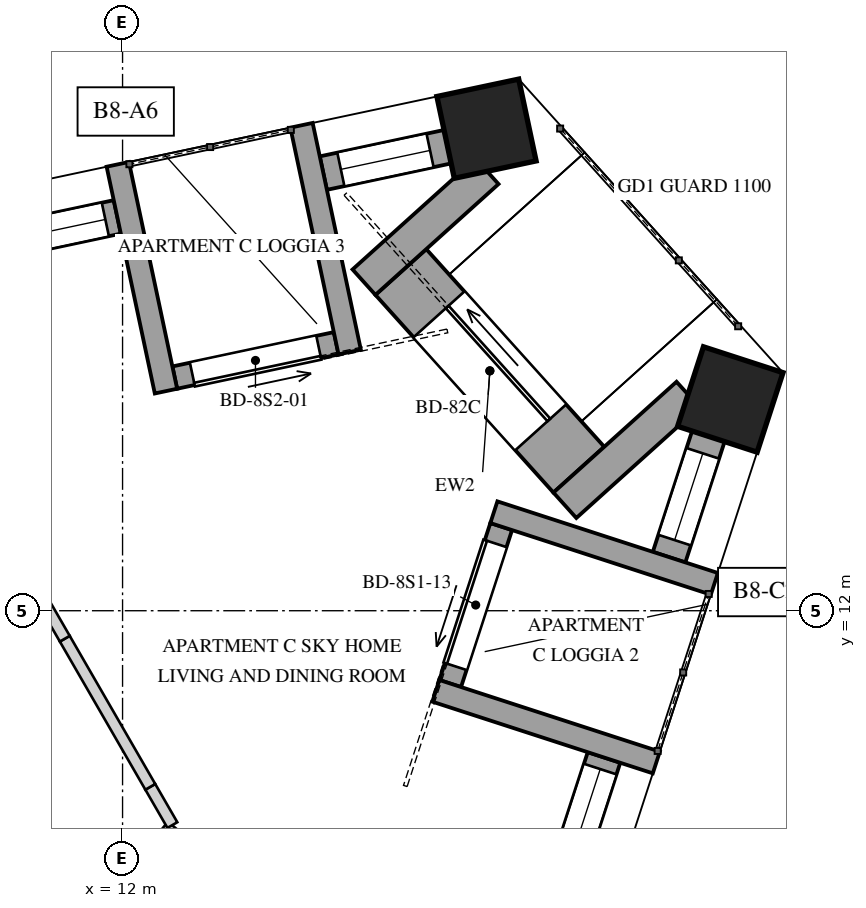
"""IFC4 building model, lengths in metres.
Left out: names, types, materials, properties, quantities, classifications, styles, units other than length and angle.
Written with IfcOpenShell. Run it as: python <this file> out.ifc"""

import sys

from ifc_helpers import new_model, si_unit, direction, frame, frame_2d, origin, origin_2d, place, context, subcontext, project, spatial, rectangle, extrude, element, fill, save


model = new_model("IFC4")
c1 = context("Model", 3, precision=1e-05, world=origin(), true_north=direction((0.0, 1.0)))
c2 = subcontext(c1, "Body", "Model", "MODEL_VIEW")
j1 = project(units=[si_unit("LENGTHUNIT", "METRE"), si_unit("PLANEANGLEUNIT", "RADIAN")], contexts=[c1])
p1 = place(None, origin())
s1 = spatial("IfcSite", under=j1, at=p1, CompositionType="ELEMENT")
p2 = place(p1, origin())
s2 = spatial("IfcBuilding", under=s1, at=p2, CompositionType="ELEMENT")
p3 = place(p2, frame((0.0, 0.0, 344.4)))
s3 = spatial("IfcBuildingStorey", under=s2, at=p3, CompositionType="ELEMENT", Elevation=344.4)
for number, where, z_axis, x_axis in (
    (1, (19.996, 14.779, 0.0), (0.0, 0.0, 1.0), (0.309, 0.951, 0.0)),
    (2, (16.788, 18.341, 0.0), (0.0, 0.0, 1.0), (-0.978, -0.208, 0.0)),
):
    element("IfcColumn", number, at=place(p3, frame(where, z_axis=z_axis, x_axis=x_axis)), inside=s3, PredefinedType="COLUMN", context=c2, shape_type="SweptSolid", body=[
        extrude(rectangle(XDim=1.1, YDim=1.1, at=origin_2d()), origin(), (0.0, 0.0, 1.0), 4.0),
    ])
p4 = place(p3, frame((17.632, 7.909, 0.0), z_axis=(0.0, 0.0, 1.0), x_axis=(0.309027740273, 0.951053024674, 0.0)))
e3 = element("IfcWall", 3, at=p4, inside=s3, PredefinedType="SOLIDWALL", context=c2, shape_type="SweptSolid", body=[
    extrude(rectangle(XDim=2.271, YDim=0.45, at=frame_2d((1.136, 0.0))), origin(), (0.0, 0.0, 1.0), 3.3),
])
p5 = place(p4, frame((0.161, 0.0, 0.4)))
e4 = element("IfcOpeningElement", 4, at=p5, cuts=e3, PredefinedType="OPENING", context=c2, shape_type="SweptSolid", body=[
    extrude(rectangle(XDim=1.95, YDim=2.75, at=frame_2d((0.975, 1.375))), frame((0.0, 0.235, 0.0), z_axis=(0.0, -1.0, 0.0), x_axis=(1.0, 0.0, 0.0)), (0.0, 0.0, 1.0), 0.47),
])
p6 = place(p3, frame((19.19, 12.705, 0.0), z_axis=(0.0, 0.0, 1.0), x_axis=(0.30898696848, 0.951066271776, 0.0)))
e5 = element("IfcWall", 5, at=p6, inside=s3, PredefinedType="SOLIDWALL", context=c2, shape_type="SweptSolid", body=[
    extrude(rectangle(XDim=1.671, YDim=0.45, at=frame_2d((0.835, 0.0))), origin(), (0.0, 0.0, 1.0), 3.3),
])
p7 = place(p6, frame((0.236, 0.0, 0.4)))
e6 = element("IfcOpeningElement", 6, at=p7, cuts=e5, PredefinedType="OPENING", context=c2, shape_type="SweptSolid", body=[
    extrude(rectangle(XDim=1.2, YDim=2.1, at=frame_2d((0.6, 1.05))), frame((0.0, 0.235, 0.0), z_axis=(0.0, -1.0, 0.0), x_axis=(1.0, 0.0, 0.0)), (0.0, 0.0, 1.0), 0.47),
])
p8 = place(p3, frame((16.276, 18.105, 0.0), z_axis=(0.0, 0.0, 1.0), x_axis=(-0.978126168783, -0.208012494676, 0.0)))
e7 = element("IfcWall", 7, at=p8, inside=s3, PredefinedType="SOLIDWALL", context=c2, shape_type="SweptSolid", body=[
    extrude(rectangle(XDim=1.671, YDim=0.45, at=frame_2d((0.836, 0.0))), origin(), (0.0, 0.0, 1.0), 3.3),
])
p9 = place(p8, frame((0.236, 0.0, 0.4)))
e8 = element("IfcOpeningElement", 8, at=p9, cuts=e7, PredefinedType="OPENING", context=c2, shape_type="SweptSolid", body=[
    extrude(rectangle(XDim=1.2, YDim=2.1, at=frame_2d((0.6, 1.05))), frame((0.0, 0.235, 0.0), z_axis=(0.0, -1.0, 0.0), x_axis=(1.0, 0.0, 0.0)), (0.0, 0.0, 1.0), 0.47),
])
p10 = place(p3, frame((11.931, 17.181, 0.0), z_axis=(0.0, 0.0, 1.0), x_axis=(-0.978153386925, -0.207884467067, 0.0)))
e9 = element("IfcWall", 9, at=p10, inside=s3, PredefinedType="SOLIDWALL", context=c2, shape_type="SweptSolid", body=[
    extrude(rectangle(XDim=2.271, YDim=0.45, at=frame_2d((1.136, 0.0))), origin(), (0.0, 0.0, 1.0), 3.3),
])
p11 = place(p10, frame((0.161, 0.0, 0.4)))
e10 = element("IfcOpeningElement", 10, at=p11, cuts=e9, PredefinedType="OPENING", context=c2, shape_type="SweptSolid", body=[
    extrude(rectangle(XDim=1.95, YDim=2.75, at=frame_2d((0.975, 1.375))), frame((0.0, 0.235, 0.0), z_axis=(0.0, -1.0, 0.0), x_axis=(1.0, 0.0, 0.0)), (0.0, 0.0, 1.0), 0.47),
])
p12 = place(p3, frame((16.311, 11.042, 0.0), z_axis=(0.0, 0.0, 1.0), x_axis=(0.308999623589, 0.95106216023, 0.0)))
e11 = element("IfcWall", 11, at=p12, inside=s3, PredefinedType="SOLIDWALL", context=c2, shape_type="SweptSolid", body=[
    extrude(rectangle(XDim=2.171, YDim=0.3, at=frame_2d((1.085, 0.0))), origin(), (0.0, 0.0, 1.0), 3.3),
])
p13 = place(p12, frame((0.236, 0.0, 0.0)))
e12 = element("IfcOpeningElement", 12, at=p13, cuts=e11, PredefinedType="OPENING", context=c2, shape_type="SweptSolid", body=[
    extrude(rectangle(XDim=1.7, YDim=2.5, at=frame_2d((0.85, 1.25))), frame((0.0, 0.16, 0.0), z_axis=(0.0, -1.0, 0.0), x_axis=(1.0, 0.0, 0.0)), (0.0, 0.0, 1.0), 0.32),
])
for number, where, z_axis, x_axis in (
    (13, (19.022, 10.003, 0.0), (0.0, 0.0, 1.0), (-0.951, 0.309, 0.0)),
    (14, (19.786, 12.354, 0.0), (0.0, 0.0, 1.0), (-0.951, 0.309, 0.0)),
):
    element("IfcWall", number, at=place(p3, frame(where, z_axis=z_axis, x_axis=x_axis)), inside=s3, PredefinedType="SOLIDWALL", context=c2, shape_type="SweptSolid", body=[
        extrude(rectangle(XDim=3.05, YDim=0.3, at=frame_2d((1.525, 0.0))), origin(), (0.0, 0.0, 1.0), 3.3),
    ])
p14 = place(p3, frame((14.811, 15.518, 0.0), z_axis=(0.0, 0.0, 1.0), x_axis=(-0.978148276005, -0.207908513891, 0.0)))
e15 = element("IfcWall", 15, at=p14, inside=s3, PredefinedType="SOLIDWALL", context=c2, shape_type="SweptSolid", body=[
    extrude(rectangle(XDim=2.171, YDim=0.3, at=frame_2d((1.085, 0.0))), origin(), (0.0, 0.0, 1.0), 3.3),
])
p15 = place(p14, frame((0.236, 0.0, 0.0)))
e16 = element("IfcOpeningElement", 16, at=p15, cuts=e15, PredefinedType="OPENING", context=c2, shape_type="SweptSolid", body=[
    extrude(rectangle(XDim=1.7, YDim=2.5, at=frame_2d((0.85, 1.25))), frame((0.0, 0.16, 0.0), z_axis=(0.0, -1.0, 0.0), x_axis=(1.0, 0.0, 0.0)), (0.0, 0.0, 1.0), 0.32),
])
p16 = place(p3, frame((14.354, 18.386, 0.0), z_axis=(0.0, 0.0, 1.0), x_axis=(0.207954487003, -0.978138503145, 0.0)))
e17 = element("IfcWall", 17, at=p16, inside=s3, PredefinedType="SOLIDWALL", context=c2, shape_type="SweptSolid", body=[
    extrude(rectangle(XDim=3.05, YDim=0.3, at=frame_2d((1.525, 0.0))), origin(), (0.0, 0.0, 1.0), 3.3),
])
p17 = place(p3, frame((11.937, 17.872, 0.0), z_axis=(0.0, 0.0, 1.0), x_axis=(0.207894179953, -0.978151322619, 0.0)))
e18 = element("IfcWall", 18, at=p17, inside=s3, PredefinedType="SOLIDWALL", context=c2, shape_type="SweptSolid", body=[
    extrude(rectangle(XDim=3.05, YDim=0.3, at=frame_2d((1.525, 0.0))), origin(), (0.0, 0.0, 1.0), 3.3),
])
p18 = place(p3, frame((15.661, 16.456, 0.0), z_axis=(0.0, 0.0, 1.0), x_axis=(0.669134277936, -0.743141519559, 0.0)))
e19 = element("IfcWall", 19, at=p18, inside=s3, PredefinedType="SOLIDWALL", context=c2, shape_type="SweptSolid", body=[
    extrude(rectangle(XDim=3.5, YDim=0.9, at=frame_2d((1.75, 0.0))), origin(), (0.0, 0.0, 1.0), 3.3),
])
p19 = place(p18, frame((0.75, 0.0, 0.0)))
e20 = element("IfcOpeningElement", 20, at=p19, cuts=e19, PredefinedType="OPENING", context=c2, shape_type="SweptSolid", body=[
    extrude(rectangle(XDim=2.0, YDim=2.4, at=frame_2d((1.0, 1.2))), frame((0.0, 0.46, 0.0), z_axis=(0.0, -1.0, 0.0), x_axis=(1.0, 0.0, 0.0)), (0.0, 0.0, 1.0), 0.92),
])
p20 = place(p3, frame((16.796, 17.781, 0.0), z_axis=(0.0, 0.0, 1.0), x_axis=(-0.743165997662, -0.669107091518, 0.0)))
e21 = element("IfcWall", 21, at=p20, inside=s3, PredefinedType="SOLIDWALL", context=c2, shape_type="SweptSolid", body=[
    extrude(rectangle(XDim=2.179, YDim=0.45, at=frame_2d((1.089, 0.0))), origin(), (0.0, 0.0, 1.0), 2.55),
])
p21 = place(p3, frame((19.439, 14.845, 0.0), z_axis=(0.0, 0.0, 1.0), x_axis=(-0.743110286166, -0.669168964159, 0.0)))
e22 = element("IfcWall", 22, at=p21, inside=s3, PredefinedType="SOLIDWALL", context=c2, shape_type="SweptSolid", body=[
    extrude(rectangle(XDim=2.179, YDim=0.45, at=frame_2d((1.09, 0.0))), origin(), (0.0, 0.0, 1.0), 2.55),
])
p22 = place(p3, frame((11.875, 8.233, 0.0), z_axis=(0.0, 0.0, 1.0), x_axis=(0.637588147155, 0.770377410499, 0.0)))
e23 = element("IfcWall", 23, at=p22, inside=s3, PredefinedType="PARTITIONING", context=c2, shape_type="SweptSolid", body=[
    extrude(rectangle(XDim=1.223, YDim=0.15, at=frame_2d((0.611, 0.0))), origin(), (0.0, 0.0, 1.0), 2.55),
])
p23 = place(p3, frame((12.656, 9.18, 0.0), z_axis=(0.0, 0.0, 1.0), x_axis=(-0.500025556299, 0.866010648346, 0.0)))
e24 = element("IfcWall", 24, at=p23, inside=s3, PredefinedType="PARTITIONING", context=c2, shape_type="SweptSolid", body=[
    extrude(rectangle(XDim=0.581, YDim=0.15, at=frame_2d((0.291, 0.0))), origin(), (0.0, 0.0, 1.0), 2.55),
])
p24 = place(p3, frame((12.365, 9.683, 0.0), z_axis=(0.0, 0.0, 1.0), x_axis=(-0.499966648284, 0.866044658551, 0.0)))
e25 = element("IfcWall", 25, at=p24, inside=s3, PredefinedType="PARTITIONING", context=c2, shape_type="SweptSolid", body=[
    extrude(rectangle(XDim=2.25, YDim=0.15, at=frame_2d((1.125, 0.0))), origin(), (0.0, 0.0, 1.0), 3.65),
])
p25 = place(p3, frame((11.24, 11.632, 0.0), z_axis=(0.0, 0.0, 1.0), x_axis=(-0.499945096919, 0.866057099772, 0.0)))
e26 = element("IfcWall", 26, at=p25, inside=s3, PredefinedType="PARTITIONING", context=c2, shape_type="SweptSolid", body=[
    extrude(rectangle(XDim=0.917, YDim=0.15, at=frame_2d((0.459, 0.0))), origin(), (0.0, 0.0, 1.0), 2.55),
])
p26 = place(p5, origin())
e27 = element("IfcWindow", 27, at=p26, inside=s3, PartitioningType="SINGLE_PANEL", PredefinedType="WINDOW", context=c2, shape_type="SweptSolid", body=[
    extrude(rectangle(XDim=1.95, YDim=2.75, at=frame_2d((0.975, 1.375))), frame((0.0, 0.03, 0.0), z_axis=(0.0, -1.0, 0.0), x_axis=(1.0, 0.0, 0.0)), (0.0, 0.0, 1.0), 0.06),
])
fill(e4, e27)
p27 = place(p7, origin())
e28 = element("IfcWindow", 28, at=p27, inside=s3, PartitioningType="SINGLE_PANEL", PredefinedType="WINDOW", context=c2, shape_type="SweptSolid", body=[
    extrude(rectangle(XDim=1.2, YDim=2.1, at=frame_2d((0.6, 1.05))), frame((0.0, 0.03, 0.0), z_axis=(0.0, -1.0, 0.0), x_axis=(1.0, 0.0, 0.0)), (0.0, 0.0, 1.0), 0.06),
])
fill(e6, e28)
p28 = place(p9, origin())
e29 = element("IfcWindow", 29, at=p28, inside=s3, PartitioningType="SINGLE_PANEL", PredefinedType="WINDOW", context=c2, shape_type="SweptSolid", body=[
    extrude(rectangle(XDim=1.2, YDim=2.1, at=frame_2d((0.6, 1.05))), frame((0.0, 0.03, 0.0), z_axis=(0.0, -1.0, 0.0), x_axis=(1.0, 0.0, 0.0)), (0.0, 0.0, 1.0), 0.06),
])
fill(e8, e29)
p29 = place(p11, origin())
e30 = element("IfcWindow", 30, at=p29, inside=s3, PartitioningType="SINGLE_PANEL", PredefinedType="WINDOW", context=c2, shape_type="SweptSolid", body=[
    extrude(rectangle(XDim=1.95, YDim=2.75, at=frame_2d((0.975, 1.375))), frame((0.0, 0.03, 0.0), z_axis=(0.0, -1.0, 0.0), x_axis=(1.0, 0.0, 0.0)), (0.0, 0.0, 1.0), 0.06),
])
fill(e10, e30)
p30 = place(p13, origin())
e31 = element("IfcDoor", 31, at=p30, inside=s3, OperationType="SLIDING_TO_LEFT", PredefinedType="DOOR", context=c2, shape_type="SweptSolid", body=[
    extrude(rectangle(XDim=1.7, YDim=2.5, at=frame_2d((0.85, 1.25))), frame((0.0, 0.025, 0.0), z_axis=(0.0, -1.0, 0.0), x_axis=(1.0, 0.0, 0.0)), (0.0, 0.0, 1.0), 0.05),
])
fill(e12, e31)
p31 = place(p15, origin())
e32 = element("IfcDoor", 32, at=p31, inside=s3, OperationType="SLIDING_TO_LEFT", PredefinedType="DOOR", context=c2, shape_type="SweptSolid", body=[
    extrude(rectangle(XDim=1.7, YDim=2.5, at=frame_2d((0.85, 1.25))), frame((0.0, 0.025, 0.0), z_axis=(0.0, -1.0, 0.0), x_axis=(1.0, 0.0, 0.0)), (0.0, 0.0, 1.0), 0.05),
])
fill(e16, e32)
p32 = place(p19, origin())
e33 = element("IfcDoor", 33, at=p32, inside=s3, OperationType="SLIDING_TO_LEFT", PredefinedType="DOOR", context=c2, shape_type="SweptSolid", body=[
    extrude(rectangle(XDim=2.0, YDim=2.4, at=frame_2d((1.0, 1.2))), frame((0.0, 0.025, 0.0), z_axis=(0.0, -1.0, 0.0), x_axis=(1.0, 0.0, 0.0)), (0.0, 0.0, 1.0), 0.05),
])
fill(e20, e33)
save(model, sys.argv[1])
